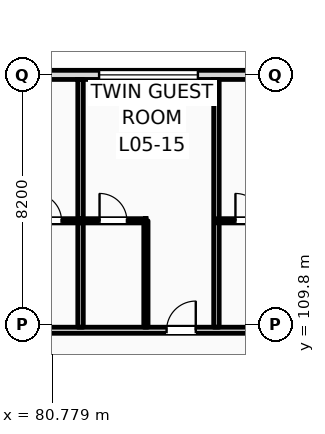
"""IFC4 building model, lengths in metres.
Left out: names, types, materials, properties, quantities, classifications, styles, units other than length and angle.
Written with IfcOpenShell. Run it as: python <this file> out.ifc"""

import sys

from ifc_helpers import new_model, si_unit, direction, frame, frame_2d, origin, place, context, subcontext, project, spatial, rectangle, extrude, element, fill, save


model = new_model("IFC4")
c1 = context("Model", 3, precision=1e-05, world=origin(), true_north=direction((0.0, 1.0)))
c2 = subcontext(c1, "Body", "Model", "MODEL_VIEW")
j1 = project(units=[si_unit("LENGTHUNIT", "METRE"), si_unit("PLANEANGLEUNIT", "RADIAN")], contexts=[c1])
p1 = place(None, origin())
s1 = spatial("IfcSite", under=j1, at=p1, CompositionType="ELEMENT")
p2 = place(p1, origin())
s2 = spatial("IfcBuilding", under=s1, at=p2, CompositionType="ELEMENT")
p3 = place(p2, frame((0.0, 0.0, 24.6)))
s3 = spatial("IfcBuildingStorey", under=s2, at=p3, CompositionType="ELEMENT", Elevation=24.6)
p4 = place(p3, frame((22.5, 118.0, 0.0), z_axis=(0.0, 0.0, 1.0), x_axis=(1.0, 0.0, 0.0)))
e1 = element("IfcWall", 1, at=p4, inside=s3, PredefinedType="STANDARD", context=c2, shape_type="SweptSolid", body=[
    extrude(rectangle(XDim=97.5, YDim=0.3, at=frame_2d((48.75, 0.0))), origin(), (0.0, 0.0, 1.0), 2.78),
])
p5 = place(p4, frame((0.91, 0.0, 0.9)))
e2 = element("IfcOpeningElement", 2, at=p5, cuts=e1, PredefinedType="OPENING", context=c2, shape_type="SweptSolid", body=[
    extrude(rectangle(XDim=0.9, YDim=1.7, at=frame_2d((0.45, 0.85))), frame((0.0, 0.16, 0.0), z_axis=(0.0, -1.0, 0.0), x_axis=(1.0, 0.0, 0.0)), (0.0, 0.0, 1.0), 0.32),
])
p6 = place(p4, frame((6.275, 0.0, 0.0)))
e3 = element("IfcOpeningElement", 3, at=p6, cuts=e1, PredefinedType="OPENING", context=c2, shape_type="SweptSolid", body=[
    extrude(rectangle(XDim=1.2, YDim=2.25, at=frame_2d((0.6, 1.125))), frame((0.0, 0.16, 0.0), z_axis=(0.0, -1.0, 0.0), x_axis=(1.0, 0.0, 0.0)), (0.0, 0.0, 1.0), 0.32),
])
p7 = place(p4, frame((11.42, 0.0, 0.9)))
e4 = element("IfcOpeningElement", 4, at=p7, cuts=e1, PredefinedType="OPENING", context=c2, shape_type="SweptSolid", body=[
    extrude(rectangle(XDim=1.35, YDim=1.7, at=frame_2d((0.675, 0.85))), frame((0.0, 0.16, 0.0), z_axis=(0.0, -1.0, 0.0), x_axis=(1.0, 0.0, 0.0)), (0.0, 0.0, 1.0), 0.32),
])
p8 = place(p4, frame((14.345, 0.0, 0.9)))
e5 = element("IfcOpeningElement", 5, at=p8, cuts=e1, PredefinedType="OPENING", context=c2, shape_type="SweptSolid", body=[
    extrude(rectangle(XDim=1.8, YDim=1.7, at=frame_2d((0.9, 0.85))), frame((0.0, 0.16, 0.0), z_axis=(0.0, -1.0, 0.0), x_axis=(1.0, 0.0, 0.0)), (0.0, 0.0, 1.0), 0.32),
])
p9 = place(p4, frame((19.27, 0.0, 0.9)))
e6 = element("IfcOpeningElement", 6, at=p9, cuts=e1, PredefinedType="OPENING", context=c2, shape_type="SweptSolid", body=[
    extrude(rectangle(XDim=1.95, YDim=1.7, at=frame_2d((0.975, 0.85))), frame((0.0, 0.16, 0.0), z_axis=(0.0, -1.0, 0.0), x_axis=(1.0, 0.0, 0.0)), (0.0, 0.0, 1.0), 0.32),
])
p10 = place(p4, frame((22.97, 0.0, 0.0)))
e7 = element("IfcOpeningElement", 7, at=p10, cuts=e1, PredefinedType="OPENING", context=c2, shape_type="SweptSolid", body=[
    extrude(rectangle(XDim=1.2, YDim=2.25, at=frame_2d((0.6, 1.125))), frame((0.0, 0.16, 0.0), z_axis=(0.0, -1.0, 0.0), x_axis=(1.0, 0.0, 0.0)), (0.0, 0.0, 1.0), 0.32),
])
p11 = place(p4, frame((26.92, 0.0, 0.9)))
e8 = element("IfcOpeningElement", 8, at=p11, cuts=e1, PredefinedType="OPENING", context=c2, shape_type="SweptSolid", body=[
    extrude(rectangle(XDim=2.25, YDim=1.7, at=frame_2d((1.125, 0.85))), frame((0.0, 0.16, 0.0), z_axis=(0.0, -1.0, 0.0), x_axis=(1.0, 0.0, 0.0)), (0.0, 0.0, 1.0), 0.32),
])
p12 = place(p4, frame((30.645, 0.0, 0.9)))
e9 = element("IfcOpeningElement", 9, at=p12, cuts=e1, PredefinedType="OPENING", context=c2, shape_type="SweptSolid", body=[
    extrude(rectangle(XDim=2.4, YDim=1.7, at=frame_2d((1.2, 0.85))), frame((0.0, 0.16, 0.0), z_axis=(0.0, -1.0, 0.0), x_axis=(1.0, 0.0, 0.0)), (0.0, 0.0, 1.0), 0.32),
])
p13 = place(p4, frame((36.71, 0.0, 0.0)))
e10 = element("IfcOpeningElement", 10, at=p13, cuts=e1, PredefinedType="OPENING", context=c2, shape_type="SweptSolid", body=[
    extrude(rectangle(XDim=1.2, YDim=2.25, at=frame_2d((0.6, 1.125))), frame((0.0, 0.16, 0.0), z_axis=(0.0, -1.0, 0.0), x_axis=(1.0, 0.0, 0.0)), (0.0, 0.0, 1.0), 0.32),
])
p14 = place(p4, frame((39.17, 0.0, 0.0)))
e11 = element("IfcOpeningElement", 11, at=p14, cuts=e1, PredefinedType="OPENING", context=c2, shape_type="SweptSolid", body=[
    extrude(rectangle(XDim=1.2, YDim=2.25, at=frame_2d((0.6, 1.125))), frame((0.0, 0.16, 0.0), z_axis=(0.0, -1.0, 0.0), x_axis=(1.0, 0.0, 0.0)), (0.0, 0.0, 1.0), 0.32),
])
p15 = place(p4, frame((43.22, 0.0, 0.9)))
e12 = element("IfcOpeningElement", 12, at=p15, cuts=e1, PredefinedType="OPENING", context=c2, shape_type="SweptSolid", body=[
    extrude(rectangle(XDim=2.85, YDim=1.7, at=frame_2d((1.425, 0.85))), frame((0.0, 0.16, 0.0), z_axis=(0.0, -1.0, 0.0), x_axis=(1.0, 0.0, 0.0)), (0.0, 0.0, 1.0), 0.32),
])
p16 = place(p4, frame((47.29, 0.0, 0.9)))
e13 = element("IfcOpeningElement", 13, at=p16, cuts=e1, PredefinedType="OPENING", context=c2, shape_type="SweptSolid", body=[
    extrude(rectangle(XDim=1.35, YDim=1.7, at=frame_2d((0.675, 0.85))), frame((0.0, 0.16, 0.0), z_axis=(0.0, -1.0, 0.0), x_axis=(1.0, 0.0, 0.0)), (0.0, 0.0, 1.0), 0.32),
])
p17 = place(p4, frame((52.91, 0.0, 0.0)))
e14 = element("IfcOpeningElement", 14, at=p17, cuts=e1, PredefinedType="OPENING", context=c2, shape_type="SweptSolid", body=[
    extrude(rectangle(XDim=1.2, YDim=2.25, at=frame_2d((0.6, 1.125))), frame((0.0, 0.16, 0.0), z_axis=(0.0, -1.0, 0.0), x_axis=(1.0, 0.0, 0.0)), (0.0, 0.0, 1.0), 0.32),
])
p18 = place(p4, frame((55.69, 0.0, 0.9)))
e15 = element("IfcOpeningElement", 15, at=p18, cuts=e1, PredefinedType="OPENING", context=c2, shape_type="SweptSolid", body=[
    extrude(rectangle(XDim=0.9, YDim=1.7, at=frame_2d((0.45, 0.85))), frame((0.0, 0.16, 0.0), z_axis=(0.0, -1.0, 0.0), x_axis=(1.0, 0.0, 0.0)), (0.0, 0.0, 1.0), 0.32),
])
p19 = place(p4, frame((59.82, 0.0, 0.9)))
e16 = element("IfcOpeningElement", 16, at=p19, cuts=e1, PredefinedType="OPENING", context=c2, shape_type="SweptSolid", body=[
    extrude(rectangle(XDim=3.25, YDim=1.7, at=frame_2d((1.625, 0.85))), frame((0.0, 0.16, 0.0), z_axis=(0.0, -1.0, 0.0), x_axis=(1.0, 0.0, 0.0)), (0.0, 0.0, 1.0), 0.32),
])
p20 = place(p4, frame((65.89, 0.0, 0.9)))
e17 = element("IfcOpeningElement", 17, at=p20, cuts=e1, PredefinedType="OPENING", context=c2, shape_type="SweptSolid", body=[
    extrude(rectangle(XDim=1.1, YDim=1.7, at=frame_2d((0.55, 0.85))), frame((0.0, 0.16, 0.0), z_axis=(0.0, -1.0, 0.0), x_axis=(1.0, 0.0, 0.0)), (0.0, 0.0, 1.0), 0.32),
])
p21 = place(p4, frame((69.245, 0.0, 0.0)))
e18 = element("IfcOpeningElement", 18, at=p21, cuts=e1, PredefinedType="OPENING", context=c2, shape_type="SweptSolid", body=[
    extrude(rectangle(XDim=1.2, YDim=2.25, at=frame_2d((0.6, 1.125))), frame((0.0, 0.16, 0.0), z_axis=(0.0, -1.0, 0.0), x_axis=(1.0, 0.0, 0.0)), (0.0, 0.0, 1.0), 0.32),
])
p22 = place(p4, frame((73.69, 0.0, 0.9)))
e19 = element("IfcOpeningElement", 19, at=p22, cuts=e1, PredefinedType="OPENING", context=c2, shape_type="SweptSolid", body=[
    extrude(rectangle(XDim=1.8, YDim=1.7, at=frame_2d((0.9, 0.85))), frame((0.0, 0.16, 0.0), z_axis=(0.0, -1.0, 0.0), x_axis=(1.0, 0.0, 0.0)), (0.0, 0.0, 1.0), 0.32),
])
p23 = place(p4, frame((76.62, 0.0, 0.9)))
e20 = element("IfcOpeningElement", 20, at=p23, cuts=e1, PredefinedType="OPENING", context=c2, shape_type="SweptSolid", body=[
    extrude(rectangle(XDim=3.25, YDim=1.7, at=frame_2d((1.625, 0.85))), frame((0.0, 0.16, 0.0), z_axis=(0.0, -1.0, 0.0), x_axis=(1.0, 0.0, 0.0)), (0.0, 0.0, 1.0), 0.32),
])
p24 = place(p4, frame((81.895, 0.0, 0.9)))
e21 = element("IfcOpeningElement", 21, at=p24, cuts=e1, PredefinedType="OPENING", context=c2, shape_type="SweptSolid", body=[
    extrude(rectangle(XDim=1.1, YDim=1.5, at=frame_2d((0.55, 0.75))), frame((0.0, 0.16, 0.0), z_axis=(0.0, -1.0, 0.0), x_axis=(1.0, 0.0, 0.0)), (0.0, 0.0, 1.0), 0.32),
])
p25 = place(p4, frame((86.02, 0.0, 0.9)))
e22 = element("IfcOpeningElement", 22, at=p25, cuts=e1, PredefinedType="OPENING", context=c2, shape_type="SweptSolid", body=[
    extrude(rectangle(XDim=1.25, YDim=1.6, at=frame_2d((0.625, 0.8))), frame((0.0, 0.16, 0.0), z_axis=(0.0, -1.0, 0.0), x_axis=(1.0, 0.0, 0.0)), (0.0, 0.0, 1.0), 0.32),
])
p26 = place(p4, frame((90.145, 0.0, 0.9)))
e23 = element("IfcOpeningElement", 23, at=p26, cuts=e1, PredefinedType="OPENING", context=c2, shape_type="SweptSolid", body=[
    extrude(rectangle(XDim=1.4, YDim=1.7, at=frame_2d((0.7, 0.85))), frame((0.0, 0.16, 0.0), z_axis=(0.0, -1.0, 0.0), x_axis=(1.0, 0.0, 0.0)), (0.0, 0.0, 1.0), 0.32),
])
p27 = place(p4, frame((94.155, 0.0, 0.9)))
e24 = element("IfcOpeningElement", 24, at=p27, cuts=e1, PredefinedType="OPENING", context=c2, shape_type="SweptSolid", body=[
    extrude(rectangle(XDim=1.6, YDim=1.7, at=frame_2d((0.8, 0.85))), frame((0.0, 0.16, 0.0), z_axis=(0.0, -1.0, 0.0), x_axis=(1.0, 0.0, 0.0)), (0.0, 0.0, 1.0), 0.32),
])
p28 = place(p3, frame((10.65, 109.6, 0.0), z_axis=(0.0, 0.0, 1.0), x_axis=(1.0, 0.0, 0.0)))
e25 = element("IfcWall", 25, at=p28, inside=s3, PredefinedType="PARTITIONING", context=c2, shape_type="SweptSolid", body=[
    extrude(rectangle(XDim=109.21, YDim=0.2, at=frame_2d((54.605, 0.0))), origin(), (0.0, 0.0, 1.0), 2.78),
])
p29 = place(p28, frame((12.705, 0.0, 0.0)))
e26 = element("IfcOpeningElement", 26, at=p29, cuts=e25, PredefinedType="OPENING", context=c2, shape_type="SweptSolid", body=[
    extrude(rectangle(XDim=1.02, YDim=2.2, at=frame_2d((0.51, 1.1))), frame((0.0, 0.11, 0.0), z_axis=(0.0, -1.0, 0.0), x_axis=(1.0, 0.0, 0.0)), (0.0, 0.0, 1.0), 0.22),
])
p30 = place(p28, frame((19.26, 0.0, 0.0)))
e27 = element("IfcOpeningElement", 27, at=p30, cuts=e25, PredefinedType="OPENING", context=c2, shape_type="SweptSolid", body=[
    extrude(rectangle(XDim=1.02, YDim=2.2, at=frame_2d((0.51, 1.1))), frame((0.0, 0.11, 0.0), z_axis=(0.0, -1.0, 0.0), x_axis=(1.0, 0.0, 0.0)), (0.0, 0.0, 1.0), 0.22),
])
p31 = place(p28, frame((23.71, 0.0, 0.0)))
e28 = element("IfcOpeningElement", 28, at=p31, cuts=e25, PredefinedType="OPENING", context=c2, shape_type="SweptSolid", body=[
    extrude(rectangle(XDim=1.02, YDim=2.2, at=frame_2d((0.51, 1.1))), frame((0.0, 0.11, 0.0), z_axis=(0.0, -1.0, 0.0), x_axis=(1.0, 0.0, 0.0)), (0.0, 0.0, 1.0), 0.22),
])
p32 = place(p28, frame((27.66, 0.0, 0.0)))
e29 = element("IfcOpeningElement", 29, at=p32, cuts=e25, PredefinedType="OPENING", context=c2, shape_type="SweptSolid", body=[
    extrude(rectangle(XDim=1.02, YDim=2.2, at=frame_2d((0.51, 1.1))), frame((0.0, 0.11, 0.0), z_axis=(0.0, -1.0, 0.0), x_axis=(1.0, 0.0, 0.0)), (0.0, 0.0, 1.0), 0.22),
])
p33 = place(p28, frame((31.89, 0.0, 0.0)))
e30 = element("IfcOpeningElement", 30, at=p33, cuts=e25, PredefinedType="OPENING", context=c2, shape_type="SweptSolid", body=[
    extrude(rectangle(XDim=0.96, YDim=2.2, at=frame_2d((0.48, 1.1))), frame((0.0, 0.11, 0.0), z_axis=(0.0, -1.0, 0.0), x_axis=(1.0, 0.0, 0.0)), (0.0, 0.0, 1.0), 0.22),
])
p34 = place(p28, frame((33.94, 0.0, 0.0)))
e31 = element("IfcOpeningElement", 31, at=p34, cuts=e25, PredefinedType="OPENING", context=c2, shape_type="SweptSolid", body=[
    extrude(rectangle(XDim=0.96, YDim=2.2, at=frame_2d((0.48, 1.1))), frame((0.0, 0.11, 0.0), z_axis=(0.0, -1.0, 0.0), x_axis=(1.0, 0.0, 0.0)), (0.0, 0.0, 1.0), 0.22),
])
p35 = place(p28, frame((40.29, 0.0, 0.0)))
e32 = element("IfcOpeningElement", 32, at=p35, cuts=e25, PredefinedType="OPENING", context=c2, shape_type="SweptSolid", body=[
    extrude(rectangle(XDim=0.96, YDim=2.2, at=frame_2d((0.48, 1.1))), frame((0.0, 0.11, 0.0), z_axis=(0.0, -1.0, 0.0), x_axis=(1.0, 0.0, 0.0)), (0.0, 0.0, 1.0), 0.22),
])
p36 = place(p28, frame((42.34, 0.0, 0.0)))
e33 = element("IfcOpeningElement", 33, at=p36, cuts=e25, PredefinedType="OPENING", context=c2, shape_type="SweptSolid", body=[
    extrude(rectangle(XDim=0.96, YDim=2.2, at=frame_2d((0.48, 1.1))), frame((0.0, 0.11, 0.0), z_axis=(0.0, -1.0, 0.0), x_axis=(1.0, 0.0, 0.0)), (0.0, 0.0, 1.0), 0.22),
])
p37 = place(p28, frame((48.69, 0.0, 0.0)))
e34 = element("IfcOpeningElement", 34, at=p37, cuts=e25, PredefinedType="OPENING", context=c2, shape_type="SweptSolid", body=[
    extrude(rectangle(XDim=0.96, YDim=2.2, at=frame_2d((0.48, 1.1))), frame((0.0, 0.11, 0.0), z_axis=(0.0, -1.0, 0.0), x_axis=(1.0, 0.0, 0.0)), (0.0, 0.0, 1.0), 0.22),
])
p38 = place(p28, frame((50.74, 0.0, 0.0)))
e35 = element("IfcOpeningElement", 35, at=p38, cuts=e25, PredefinedType="OPENING", context=c2, shape_type="SweptSolid", body=[
    extrude(rectangle(XDim=0.96, YDim=2.2, at=frame_2d((0.48, 1.1))), frame((0.0, 0.11, 0.0), z_axis=(0.0, -1.0, 0.0), x_axis=(1.0, 0.0, 0.0)), (0.0, 0.0, 1.0), 0.22),
])
p39 = place(p28, frame((57.09, 0.0, 0.0)))
e36 = element("IfcOpeningElement", 36, at=p39, cuts=e25, PredefinedType="OPENING", context=c2, shape_type="SweptSolid", body=[
    extrude(rectangle(XDim=0.96, YDim=2.2, at=frame_2d((0.48, 1.1))), frame((0.0, 0.11, 0.0), z_axis=(0.0, -1.0, 0.0), x_axis=(1.0, 0.0, 0.0)), (0.0, 0.0, 1.0), 0.22),
])
p40 = place(p28, frame((59.14, 0.0, 0.0)))
e37 = element("IfcOpeningElement", 37, at=p40, cuts=e25, PredefinedType="OPENING", context=c2, shape_type="SweptSolid", body=[
    extrude(rectangle(XDim=0.96, YDim=2.2, at=frame_2d((0.48, 1.1))), frame((0.0, 0.11, 0.0), z_axis=(0.0, -1.0, 0.0), x_axis=(1.0, 0.0, 0.0)), (0.0, 0.0, 1.0), 0.22),
])
p41 = place(p28, frame((65.49, 0.0, 0.0)))
e38 = element("IfcOpeningElement", 38, at=p41, cuts=e25, PredefinedType="OPENING", context=c2, shape_type="SweptSolid", body=[
    extrude(rectangle(XDim=0.96, YDim=2.2, at=frame_2d((0.48, 1.1))), frame((0.0, 0.11, 0.0), z_axis=(0.0, -1.0, 0.0), x_axis=(1.0, 0.0, 0.0)), (0.0, 0.0, 1.0), 0.22),
])
p42 = place(p28, frame((67.54, 0.0, 0.0)))
e39 = element("IfcOpeningElement", 39, at=p42, cuts=e25, PredefinedType="OPENING", context=c2, shape_type="SweptSolid", body=[
    extrude(rectangle(XDim=0.96, YDim=2.2, at=frame_2d((0.48, 1.1))), frame((0.0, 0.11, 0.0), z_axis=(0.0, -1.0, 0.0), x_axis=(1.0, 0.0, 0.0)), (0.0, 0.0, 1.0), 0.22),
])
p43 = place(p28, frame((73.89, 0.0, 0.0)))
e40 = element("IfcOpeningElement", 40, at=p43, cuts=e25, PredefinedType="OPENING", context=c2, shape_type="SweptSolid", body=[
    extrude(rectangle(XDim=0.96, YDim=2.2, at=frame_2d((0.48, 1.1))), frame((0.0, 0.11, 0.0), z_axis=(0.0, -1.0, 0.0), x_axis=(1.0, 0.0, 0.0)), (0.0, 0.0, 1.0), 0.22),
])
p44 = place(p28, frame((78.09, 0.0, 0.0)))
e41 = element("IfcOpeningElement", 41, at=p44, cuts=e25, PredefinedType="OPENING", context=c2, shape_type="SweptSolid", body=[
    extrude(rectangle(XDim=0.96, YDim=2.2, at=frame_2d((0.48, 1.1))), frame((0.0, 0.11, 0.0), z_axis=(0.0, -1.0, 0.0), x_axis=(1.0, 0.0, 0.0)), (0.0, 0.0, 1.0), 0.22),
])
p45 = place(p28, frame((82.29, 0.0, 0.0)))
e42 = element("IfcOpeningElement", 42, at=p45, cuts=e25, PredefinedType="OPENING", context=c2, shape_type="SweptSolid", body=[
    extrude(rectangle(XDim=0.96, YDim=2.2, at=frame_2d((0.48, 1.1))), frame((0.0, 0.11, 0.0), z_axis=(0.0, -1.0, 0.0), x_axis=(1.0, 0.0, 0.0)), (0.0, 0.0, 1.0), 0.22),
])
p46 = place(p28, frame((86.49, 0.0, 0.0)))
e43 = element("IfcOpeningElement", 43, at=p46, cuts=e25, PredefinedType="OPENING", context=c2, shape_type="SweptSolid", body=[
    extrude(rectangle(XDim=0.96, YDim=2.2, at=frame_2d((0.48, 1.1))), frame((0.0, 0.11, 0.0), z_axis=(0.0, -1.0, 0.0), x_axis=(1.0, 0.0, 0.0)), (0.0, 0.0, 1.0), 0.22),
])
p47 = place(p28, frame((88.54, 0.0, 0.0)))
e44 = element("IfcOpeningElement", 44, at=p47, cuts=e25, PredefinedType="OPENING", context=c2, shape_type="SweptSolid", body=[
    extrude(rectangle(XDim=0.96, YDim=2.2, at=frame_2d((0.48, 1.1))), frame((0.0, 0.11, 0.0), z_axis=(0.0, -1.0, 0.0), x_axis=(1.0, 0.0, 0.0)), (0.0, 0.0, 1.0), 0.22),
])
p48 = place(p28, frame((94.89, 0.0, 0.0)))
e45 = element("IfcOpeningElement", 45, at=p48, cuts=e25, PredefinedType="OPENING", context=c2, shape_type="SweptSolid", body=[
    extrude(rectangle(XDim=0.96, YDim=2.2, at=frame_2d((0.48, 1.1))), frame((0.0, 0.11, 0.0), z_axis=(0.0, -1.0, 0.0), x_axis=(1.0, 0.0, 0.0)), (0.0, 0.0, 1.0), 0.22),
])
p49 = place(p28, frame((96.94, 0.0, 0.0)))
e46 = element("IfcOpeningElement", 46, at=p49, cuts=e25, PredefinedType="OPENING", context=c2, shape_type="SweptSolid", body=[
    extrude(rectangle(XDim=0.96, YDim=2.2, at=frame_2d((0.48, 1.1))), frame((0.0, 0.11, 0.0), z_axis=(0.0, -1.0, 0.0), x_axis=(1.0, 0.0, 0.0)), (0.0, 0.0, 1.0), 0.22),
])
p50 = place(p28, frame((103.29, 0.0, 0.0)))
e47 = element("IfcOpeningElement", 47, at=p50, cuts=e25, PredefinedType="OPENING", context=c2, shape_type="SweptSolid", body=[
    extrude(rectangle(XDim=0.96, YDim=2.2, at=frame_2d((0.48, 1.1))), frame((0.0, 0.11, 0.0), z_axis=(0.0, -1.0, 0.0), x_axis=(1.0, 0.0, 0.0)), (0.0, 0.0, 1.0), 0.22),
])
p51 = place(p28, frame((105.25, 0.0, 0.0)))
e48 = element("IfcOpeningElement", 48, at=p51, cuts=e25, PredefinedType="OPENING", context=c2, shape_type="SweptSolid", body=[
    extrude(rectangle(XDim=0.96, YDim=2.2, at=frame_2d((0.48, 1.1))), frame((0.0, 0.11, 0.0), z_axis=(0.0, -1.0, 0.0), x_axis=(1.0, 0.0, 0.0)), (0.0, 0.0, 1.0), 0.22),
])
p52 = place(p28, frame((2.716, 0.0, 0.0)))
e49 = element("IfcOpeningElement", 49, at=p52, cuts=e25, PredefinedType="OPENING", context=c2, shape_type="SweptSolid", body=[
    extrude(rectangle(XDim=1.35, YDim=2.25, at=frame_2d((0.675, 1.125))), frame((0.0, 0.11, 0.0), z_axis=(0.0, -1.0, 0.0), x_axis=(1.0, 0.0, 0.0)), (0.0, 0.0, 1.0), 0.22),
])
p53 = place(p28, frame((6.65, 0.0, 0.0)))
e50 = element("IfcOpeningElement", 50, at=p53, cuts=e25, PredefinedType="OPENING", context=c2, shape_type="SweptSolid", body=[
    extrude(rectangle(XDim=1.35, YDim=2.25, at=frame_2d((0.675, 1.125))), frame((0.0, 0.11, 0.0), z_axis=(0.0, -1.0, 0.0), x_axis=(1.0, 0.0, 0.0)), (0.0, 0.0, 1.0), 0.22),
])
p54 = place(p28, frame((10.583, 0.0, 0.0)))
e51 = element("IfcOpeningElement", 51, at=p54, cuts=e25, PredefinedType="OPENING", context=c2, shape_type="SweptSolid", body=[
    extrude(rectangle(XDim=1.35, YDim=2.25, at=frame_2d((0.675, 1.125))), frame((0.0, 0.11, 0.0), z_axis=(0.0, -1.0, 0.0), x_axis=(1.0, 0.0, 0.0)), (0.0, 0.0, 1.0), 0.22),
])
p55 = place(p3, frame((81.71, 109.7, 0.0), z_axis=(0.0, 0.0, 1.0), x_axis=(0.0, 1.0, 0.0)))
e52 = element("IfcWall", 52, at=p55, inside=s3, PredefinedType="PARTITIONING", context=c2, shape_type="SweptSolid", body=[
    extrude(rectangle(XDim=8.15, YDim=0.18, at=frame_2d((4.075, 0.0))), origin(), (0.0, 0.0, 1.0), 3.34),
])
p56 = place(p3, frame((79.56, 113.2, 0.0), z_axis=(0.0, 0.0, 1.0), x_axis=(1.0, 0.0, 0.0)))
e53 = element("IfcWall", 53, at=p56, inside=s3, PredefinedType="PARTITIONING", context=c2, shape_type="SweptSolid", body=[
    extrude(rectangle(XDim=2.15, YDim=0.14, at=frame_2d((1.075, 0.0))), origin(), (0.0, 0.0, 1.0), 3.34),
])
p57 = place(p56, frame((0.625, 0.0, 0.0)))
e54 = element("IfcOpeningElement", 54, at=p57, cuts=e53, PredefinedType="OPENING", context=c2, shape_type="SweptSolid", body=[
    extrude(rectangle(XDim=0.9, YDim=2.1, at=frame_2d((0.45, 1.05))), frame((0.0, 0.08, 0.0), z_axis=(0.0, -1.0, 0.0), x_axis=(1.0, 0.0, 0.0)), (0.0, 0.0, 1.0), 0.16),
])
p58 = place(p3, frame((86.18, 109.7, 0.0), z_axis=(0.0, 0.0, 1.0), x_axis=(0.0, 1.0, 0.0)))
e55 = element("IfcWall", 55, at=p58, inside=s3, PredefinedType="PARTITIONING", context=c2, shape_type="SweptSolid", body=[
    extrude(rectangle(XDim=8.15, YDim=0.18, at=frame_2d((4.075, 0.0))), origin(), (0.0, 0.0, 1.0), 3.34),
])
p59 = place(p3, frame((83.86, 109.7, 0.0), z_axis=(0.0, 0.0, 1.0), x_axis=(0.0, 1.0, 0.0)))
e56 = element("IfcWall", 56, at=p59, inside=s3, PredefinedType="PARTITIONING", context=c2, shape_type="SweptSolid", body=[
    extrude(rectangle(XDim=3.5, YDim=0.14, at=frame_2d((1.75, 0.0))), origin(), (0.0, 0.0, 1.0), 3.34),
])
p60 = place(p3, frame((81.71, 113.2, 0.0), z_axis=(0.0, 0.0, 1.0), x_axis=(1.0, 0.0, 0.0)))
e57 = element("IfcWall", 57, at=p60, inside=s3, PredefinedType="PARTITIONING", context=c2, shape_type="SweptSolid", body=[
    extrude(rectangle(XDim=2.15, YDim=0.14, at=frame_2d((1.075, 0.0))), origin(), (0.0, 0.0, 1.0), 3.34),
])
p61 = place(p60, frame((0.625, 0.0, 0.0)))
e58 = element("IfcOpeningElement", 58, at=p61, cuts=e57, PredefinedType="OPENING", context=c2, shape_type="SweptSolid", body=[
    extrude(rectangle(XDim=0.9, YDim=2.1, at=frame_2d((0.45, 1.05))), frame((0.0, 0.08, 0.0), z_axis=(0.0, -1.0, 0.0), x_axis=(1.0, 0.0, 0.0)), (0.0, 0.0, 1.0), 0.16),
])
p62 = place(p3, frame((86.18, 113.2, 0.0), z_axis=(0.0, 0.0, 1.0), x_axis=(1.0, 0.0, 0.0)))
e59 = element("IfcWall", 59, at=p62, inside=s3, PredefinedType="PARTITIONING", context=c2, shape_type="SweptSolid", body=[
    extrude(rectangle(XDim=2.15, YDim=0.14, at=frame_2d((1.075, 0.0))), origin(), (0.0, 0.0, 1.0), 3.34),
])
p63 = place(p62, frame((0.625, 0.0, 0.0)))
e60 = element("IfcOpeningElement", 60, at=p63, cuts=e59, PredefinedType="OPENING", context=c2, shape_type="SweptSolid", body=[
    extrude(rectangle(XDim=0.9, YDim=2.1, at=frame_2d((0.45, 1.05))), frame((0.0, 0.08, 0.0), z_axis=(0.0, -1.0, 0.0), x_axis=(1.0, 0.0, 0.0)), (0.0, 0.0, 1.0), 0.16),
])
p64 = place(p19, origin())
e61 = element("IfcWindow", 61, at=p64, inside=s3, PartitioningType="DOUBLE_PANEL_VERTICAL", PredefinedType="WINDOW", context=c2, shape_type="SweptSolid", body=[
    extrude(rectangle(XDim=3.25, YDim=1.7, at=frame_2d((1.625, 0.85))), frame((0.0, 0.03, 0.0), z_axis=(0.0, -1.0, 0.0), x_axis=(1.0, 0.0, 0.0)), (0.0, 0.0, 1.0), 0.06),
])
fill(e16, e61)
p65 = place(p57, origin())
e62 = element("IfcDoor", 62, at=p65, inside=s3, OperationType="SINGLE_SWING_LEFT", PredefinedType="DOOR", context=c2, shape_type="SweptSolid", body=[
    extrude(rectangle(XDim=0.9, YDim=2.1, at=frame_2d((0.45, 1.05))), frame((0.0, 0.025, 0.0), z_axis=(0.0, -1.0, 0.0), x_axis=(1.0, 0.0, 0.0)), (0.0, 0.0, 1.0), 0.05),
])
fill(e54, e62)
p66 = place(p43, origin())
e63 = element("IfcDoor", 63, at=p66, inside=s3, OperationType="SINGLE_SWING_RIGHT", PredefinedType="DOOR", context=c2, shape_type="SweptSolid", body=[
    extrude(rectangle(XDim=0.96, YDim=2.2, at=frame_2d((0.48, 1.1))), frame((0.0, 0.025, 0.0), z_axis=(0.0, -1.0, 0.0), x_axis=(1.0, 0.0, 0.0)), (0.0, 0.0, 1.0), 0.05),
])
fill(e40, e63)
p67 = place(p61, origin())
e64 = element("IfcDoor", 64, at=p67, inside=s3, OperationType="SINGLE_SWING_LEFT", PredefinedType="DOOR", context=c2, shape_type="SweptSolid", body=[
    extrude(rectangle(XDim=0.9, YDim=2.1, at=frame_2d((0.45, 1.05))), frame((0.0, 0.025, 0.0), z_axis=(0.0, -1.0, 0.0), x_axis=(1.0, 0.0, 0.0)), (0.0, 0.0, 1.0), 0.05),
])
fill(e58, e64)
p68 = place(p63, origin())
e65 = element("IfcDoor", 65, at=p68, inside=s3, OperationType="SINGLE_SWING_LEFT", PredefinedType="DOOR", context=c2, shape_type="SweptSolid", body=[
    extrude(rectangle(XDim=0.9, YDim=2.1, at=frame_2d((0.45, 1.05))), frame((0.0, 0.025, 0.0), z_axis=(0.0, -1.0, 0.0), x_axis=(1.0, 0.0, 0.0)), (0.0, 0.0, 1.0), 0.05),
])
fill(e60, e65)
save(model, sys.argv[1])
